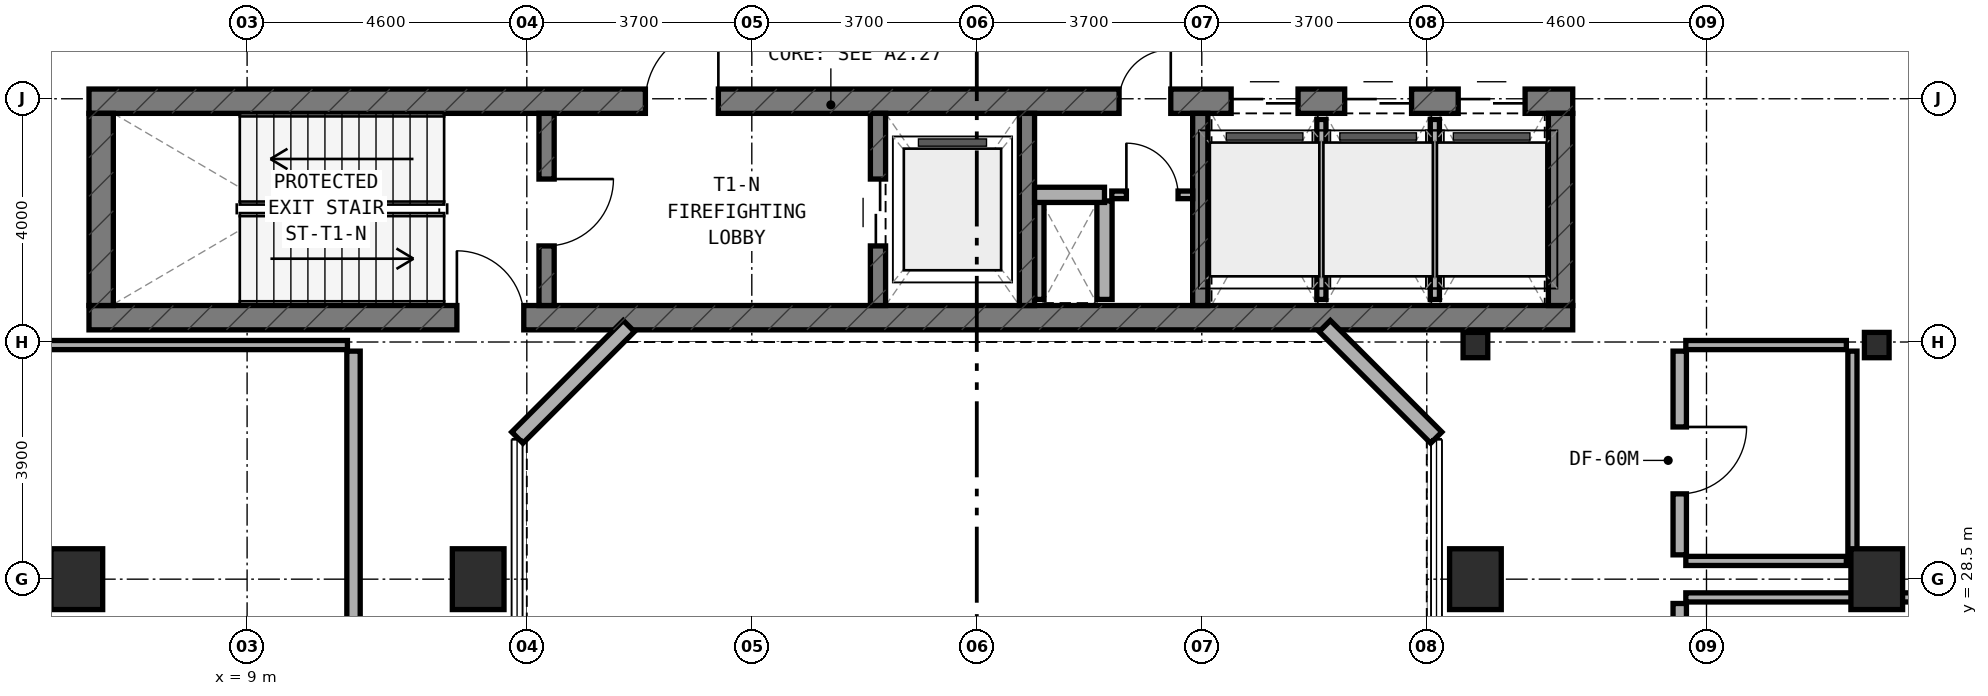
"""IFC4 building model, lengths in metres.
Left out: names, types, materials, properties, quantities, classifications, styles, units other than length and angle.
Written with IfcOpenShell. Run it as: python <this file> out.ifc"""

import sys

from ifc_helpers import new_model, si_unit, direction, frame, frame_2d, origin, origin_2d, place, context, subcontext, project, spatial, rectangle, i_section, extrude, element, fill, save


model = new_model("IFC4")
c1 = context("Model", 3, precision=1e-05, world=origin(), true_north=direction((0.0, 1.0)))
c2 = subcontext(c1, "Body", "Model", "MODEL_VIEW")
j1 = project(units=[si_unit("LENGTHUNIT", "METRE"), si_unit("PLANEANGLEUNIT", "RADIAN")], contexts=[c1])
p1 = place(None, origin())
s1 = spatial("IfcSite", under=j1, at=p1, CompositionType="ELEMENT")
p2 = place(p1, origin())
s2 = spatial("IfcBuilding", under=s1, at=p2, CompositionType="ELEMENT")
p3 = place(p2, frame((0.0, 0.0, 119.5)))
s3 = spatial("IfcBuildingStorey", under=s2, at=p3, CompositionType="ELEMENT", Elevation=119.5)
p4 = place(p3, frame((6.4, 32.8, 0.0), z_axis=(0.0, 0.0, 1.0), x_axis=(1.0, 0.0, 0.0)))
e1 = element("IfcWall", 1, at=p4, inside=s3, PredefinedType="SHEAR", context=c2, shape_type="SweptSolid", body=[
    extrude(rectangle(XDim=24.4, YDim=0.4, at=frame_2d((12.2, 0.0))), origin(), (0.0, 0.0, 1.0), 4.5),
])
p5 = place(p4, frame((6.05, 0.0, 0.0)))
e2 = element("IfcOpeningElement", 2, at=p5, cuts=e1, PredefinedType="OPENING", context=c2, shape_type="SweptSolid", body=[
    extrude(rectangle(XDim=1.1, YDim=2.15, at=frame_2d((0.55, 1.075))), frame((0.0, 0.21, 0.0), z_axis=(0.0, -1.0, 0.0), x_axis=(1.0, 0.0, 0.0)), (0.0, 0.0, 1.0), 0.42),
])
p6 = place(p3, frame((6.4, 36.36, 0.0), z_axis=(0.0, 0.0, 1.0), x_axis=(1.0, 0.0, 0.0)))
e3 = element("IfcWall", 3, at=p6, inside=s3, PredefinedType="SHEAR", context=c2, shape_type="SweptSolid", body=[
    extrude(rectangle(XDim=24.4, YDim=0.4, at=frame_2d((12.2, 0.0))), origin(), (0.0, 0.0, 1.0), 4.5),
])
p7 = place(p6, frame((9.15, 0.0, 0.0)))
e4 = element("IfcOpeningElement", 4, at=p7, cuts=e3, PredefinedType="OPENING", context=c2, shape_type="SweptSolid", body=[
    extrude(rectangle(XDim=1.2, YDim=2.15, at=frame_2d((0.6, 1.075))), frame((0.0, 0.21, 0.0), z_axis=(0.0, -1.0, 0.0), x_axis=(1.0, 0.0, 0.0)), (0.0, 0.0, 1.0), 0.42),
])
p8 = place(p6, frame((16.94, 0.0, 0.0)))
e5 = element("IfcOpeningElement", 5, at=p8, cuts=e3, PredefinedType="OPENING", context=c2, shape_type="SweptSolid", body=[
    extrude(rectangle(XDim=0.85, YDim=2.1, at=frame_2d((0.425, 1.05))), frame((0.0, 0.21, 0.0), z_axis=(0.0, -1.0, 0.0), x_axis=(1.0, 0.0, 0.0)), (0.0, 0.0, 1.0), 0.42),
])
p9 = place(p6, frame((18.783, 0.0, 0.0)))
e6 = element("IfcOpeningElement", 6, at=p9, cuts=e3, PredefinedType="OPENING", context=c2, shape_type="SweptSolid", body=[
    extrude(rectangle(XDim=1.1, YDim=2.15, at=frame_2d((0.55, 1.075))), frame((0.0, 0.21, 0.0), z_axis=(0.0, -1.0, 0.0), x_axis=(1.0, 0.0, 0.0)), (0.0, 0.0, 1.0), 0.42),
])
p10 = place(p6, frame((20.65, 0.0, 0.0)))
e7 = element("IfcOpeningElement", 7, at=p10, cuts=e3, PredefinedType="OPENING", context=c2, shape_type="SweptSolid", body=[
    extrude(rectangle(XDim=1.1, YDim=2.15, at=frame_2d((0.55, 1.075))), frame((0.0, 0.21, 0.0), z_axis=(0.0, -1.0, 0.0), x_axis=(1.0, 0.0, 0.0)), (0.0, 0.0, 1.0), 0.42),
])
p11 = place(p6, frame((22.517, 0.0, 0.0)))
e8 = element("IfcOpeningElement", 8, at=p11, cuts=e3, PredefinedType="OPENING", context=c2, shape_type="SweptSolid", body=[
    extrude(rectangle(XDim=1.1, YDim=2.15, at=frame_2d((0.55, 1.075))), frame((0.0, 0.21, 0.0), z_axis=(0.0, -1.0, 0.0), x_axis=(1.0, 0.0, 0.0)), (0.0, 0.0, 1.0), 0.42),
])
for number, where, z_axis, x_axis in (
    (9, (6.6, 33.0, 0.0), (0.0, 0.0, 1.0), (0.0, 1.0, 0.0)),
    (10, (30.6, 33.0, 0.0), (0.0, 0.0, 1.0), (0.0, 1.0, 0.0)),
):
    element("IfcWall", number, at=place(p3, frame(where, z_axis=z_axis, x_axis=x_axis)), inside=s3, PredefinedType="SHEAR", context=c2, shape_type="SweptSolid", body=[
        extrude(rectangle(XDim=3.16, YDim=0.4, at=frame_2d((1.58, 0.0))), origin(), (0.0, 0.0, 1.0), 4.5),
    ])
p12 = place(p3, frame((13.925, 33.0, 0.0), z_axis=(0.0, 0.0, 1.0), x_axis=(0.0, 1.0, 0.0)))
e11 = element("IfcWall", 11, at=p12, inside=s3, PredefinedType="STANDARD", context=c2, shape_type="SweptSolid", body=[
    extrude(rectangle(XDim=3.16, YDim=0.25, at=frame_2d((1.58, 0.0))), origin(), (0.0, 0.0, 1.0), 4.22),
])
p13 = place(p12, frame((0.98, 0.0, 0.0)))
e12 = element("IfcOpeningElement", 12, at=p13, cuts=e11, PredefinedType="OPENING", context=c2, shape_type="SweptSolid", body=[
    extrude(rectangle(XDim=1.1, YDim=2.15, at=frame_2d((0.55, 1.075))), frame((0.0, 0.135, 0.0), z_axis=(0.0, -1.0, 0.0), x_axis=(1.0, 0.0, 0.0)), (0.0, 0.0, 1.0), 0.27),
])
p14 = place(p3, frame((19.375, 33.0, 0.0), z_axis=(0.0, 0.0, 1.0), x_axis=(0.0, 1.0, 0.0)))
e13 = element("IfcWall", 13, at=p14, inside=s3, PredefinedType="STANDARD", context=c2, shape_type="SweptSolid", body=[
    extrude(rectangle(XDim=3.16, YDim=0.25, at=frame_2d((1.58, 0.0))), origin(), (0.0, 0.0, 1.0), 4.22),
])
p15 = place(p14, frame((0.98, 0.0, 0.0)))
e14 = element("IfcOpeningElement", 14, at=p15, cuts=e13, PredefinedType="OPENING", context=c2, shape_type="SweptSolid", body=[
    extrude(rectangle(XDim=1.1, YDim=2.15, at=frame_2d((0.55, 1.075))), frame((0.0, 0.135, 0.0), z_axis=(0.0, -1.0, 0.0), x_axis=(1.0, 0.0, 0.0)), (0.0, 0.0, 1.0), 0.27),
])
for number, where, z_axis, x_axis in (
    (15, (21.825, 33.0, 0.0), (0.0, 0.0, 1.0), (0.0, 1.0, 0.0)),
    (16, (24.675, 33.0, 0.0), (0.0, 0.0, 1.0), (0.0, 1.0, 0.0)),
):
    element("IfcWall", number, at=place(p3, frame(where, z_axis=z_axis, x_axis=x_axis)), inside=s3, PredefinedType="STANDARD", context=c2, shape_type="SweptSolid", body=[
        extrude(rectangle(XDim=3.16, YDim=0.25, at=frame_2d((1.58, 0.0))), origin(), (0.0, 0.0, 1.0), 4.22),
    ])
for number, where, z_axis, x_axis in (
    (17, (6.2, 28.5, 0.0), (0.0, 0.0, 1.0), (1.0, 0.0, 0.0)),
    (18, (35.8, 28.5, 0.0), (0.0, 0.0, 1.0), (1.0, 0.0, 0.0)),
):
    element("IfcColumn", number, at=place(p3, frame(where, z_axis=z_axis, x_axis=x_axis)), inside=s3, PredefinedType="COLUMN", context=c2, shape_type="SweptSolid", body=[
        extrude(rectangle(XDim=0.85, YDim=1.0, at=origin_2d()), origin(), (0.0, 0.0, 1.0), 4.5),
    ])
p16 = place(p3, frame((35.8, 32.35, 0.0), z_axis=(0.0, 0.0, 1.0), x_axis=(1.0, 0.0, 0.0)))
e19 = element("IfcColumn", 19, at=p16, inside=s3, PredefinedType="COLUMN", context=c2, shape_type="SweptSolid", body=[
    extrude(i_section(OverallWidth=0.406, OverallDepth=0.416, WebThickness=0.024, FlangeThickness=0.039, FilletRadius=0.015, at=origin_2d()), origin(), (0.0, 0.0, 1.0), 4.5),
])
p17 = place(p3, frame((12.8, 28.5, 0.0), z_axis=(0.0, 0.0, 1.0), x_axis=(1.0, 0.0, 0.0)))
e20 = element("IfcColumn", 20, at=p17, inside=s3, PredefinedType="COLUMN", context=c2, shape_type="SweptSolid", body=[
    extrude(rectangle(XDim=0.85, YDim=1.0, at=origin_2d()), origin(), (0.0, 0.0, 1.0), 4.5),
])
p18 = place(p3, frame((29.2, 32.35, 0.0), z_axis=(0.0, 0.0, 1.0), x_axis=(1.0, 0.0, 0.0)))
e21 = element("IfcColumn", 21, at=p18, inside=s3, PredefinedType="COLUMN", context=c2, shape_type="SweptSolid", body=[
    extrude(i_section(OverallWidth=0.406, OverallDepth=0.416, WebThickness=0.024, FlangeThickness=0.039, FilletRadius=0.015, at=origin_2d()), origin(), (0.0, 0.0, 1.0), 4.5),
])
p19 = place(p3, frame((29.2, 28.5, 0.0), z_axis=(0.0, 0.0, 1.0), x_axis=(1.0, 0.0, 0.0)))
e22 = element("IfcColumn", 22, at=p19, inside=s3, PredefinedType="COLUMN", context=c2, shape_type="SweptSolid", body=[
    extrude(rectangle(XDim=0.85, YDim=1.0, at=origin_2d()), origin(), (0.0, 0.0, 1.0), 4.5),
])
for number, where, z_axis, x_axis in (
    (23, (28.556, 30.828, 0.0), (0.0, 0.0, 1.0), (-0.707, 0.707, 0.0)),
    (24, (15.278, 32.662, 0.0), (0.0, 0.0, 1.0), (-0.707, -0.707, 0.0)),
):
    element("IfcWall", number, at=place(p3, frame(where, z_axis=z_axis, x_axis=x_axis)), inside=s3, PredefinedType="STANDARD", context=c2, shape_type="SweptSolid", body=[
        extrude(rectangle(XDim=2.594, YDim=0.26, at=frame_2d((1.297, 0.0))), origin(), (0.0, 0.0, 1.0), 4.22),
    ])
p20 = place(p3, frame((22.03, 33.1, 0.0), z_axis=(0.0, 0.0, 1.0), x_axis=(0.0, 1.0, 0.0)))
e25 = element("IfcWall", 25, at=p20, inside=s3, PredefinedType="PARTITIONING", context=c2, shape_type="SweptSolid", body=[
    extrude(rectangle(XDim=1.62, YDim=0.15, at=frame_2d((0.81, 0.0))), origin(), (0.0, 0.0, 1.0), 4.22),
])
p21 = place(p3, frame((23.1, 33.1, 0.0), z_axis=(0.0, 0.0, 1.0), x_axis=(0.0, 1.0, 0.0)))
e26 = element("IfcWall", 26, at=p21, inside=s3, PredefinedType="SOLIDWALL", context=c2, shape_type="SweptSolid", body=[
    extrude(rectangle(XDim=1.62, YDim=0.25, at=frame_2d((0.81, 0.0))), origin(), (0.0, 0.0, 1.0), 4.22),
])
p22 = place(p3, frame((21.95, 34.82, 0.0), z_axis=(0.0, 0.0, 1.0), x_axis=(1.0, 0.0, 0.0)))
e27 = element("IfcWall", 27, at=p22, inside=s3, PredefinedType="SOLIDWALL", context=c2, shape_type="SweptSolid", body=[
    extrude(rectangle(XDim=1.15, YDim=0.25, at=frame_2d((0.575, 0.0))), origin(), (0.0, 0.0, 1.0), 4.22),
])
p23 = place(p3, frame((23.22, 34.82, 0.0), z_axis=(0.0, 0.0, 1.0), x_axis=(1.0, 0.0, 0.0)))
e28 = element("IfcWall", 28, at=p23, inside=s3, PredefinedType="PARTITIONING", context=c2, shape_type="SweptSolid", body=[
    extrude(rectangle(XDim=1.33, YDim=0.125, at=frame_2d((0.665, 0.0))), origin(), (0.0, 0.0, 1.0), 4.22),
])
p24 = place(p23, frame((0.24, 0.0, 0.0)))
e29 = element("IfcOpeningElement", 29, at=p24, cuts=e28, PredefinedType="OPENING", context=c2, shape_type="SweptSolid", body=[
    extrude(rectangle(XDim=0.85, YDim=2.1, at=frame_2d((0.425, 1.05))), frame((0.0, 0.073, 0.0), z_axis=(0.0, -1.0, 0.0), x_axis=(1.0, 0.0, 0.0)), (0.0, 0.0, 1.0), 0.145),
])
p25 = place(p3, frame((26.667, 33.1, 0.0), z_axis=(0.0, 0.0, 1.0), x_axis=(0.0, 1.0, 0.0)))
e30 = element("IfcWall", 30, at=p25, inside=s3, PredefinedType="PARTITIONING", context=c2, shape_type="SweptSolid", body=[
    extrude(rectangle(XDim=2.96, YDim=0.15, at=frame_2d((1.48, 0.0))), origin(), (0.0, 0.0, 1.0), 4.22),
])
p26 = place(p3, frame((28.533, 33.1, 0.0), z_axis=(0.0, 0.0, 1.0), x_axis=(0.0, 1.0, 0.0)))
e31 = element("IfcWall", 31, at=p26, inside=s3, PredefinedType="PARTITIONING", context=c2, shape_type="SweptSolid", body=[
    extrude(rectangle(XDim=2.96, YDim=0.15, at=frame_2d((1.48, 0.0))), origin(), (0.0, 0.0, 1.0), 3.695),
])
p27 = place(p3, frame((32.66, 28.2, 0.0), z_axis=(0.0, 0.0, 1.0), x_axis=(1.0, 0.0, 0.0)))
e32 = element("IfcWall", 32, at=p27, inside=s3, PredefinedType="PARTITIONING", context=c2, shape_type="SweptSolid", body=[
    extrude(rectangle(XDim=8.04, YDim=0.15, at=frame_2d((4.02, 0.0))), origin(), (0.0, 0.0, 1.0), 3.835),
])
p28 = place(p3, frame((32.56, 21.9, 0.0), z_axis=(0.0, 0.0, 1.0), x_axis=(0.0, 1.0, 0.0)))
e33 = element("IfcWall", 33, at=p28, inside=s3, PredefinedType="SOLIDWALL", context=c2, shape_type="SweptSolid", body=[
    extrude(rectangle(XDim=6.2, YDim=0.22, at=frame_2d((3.1, 0.0))), origin(), (0.0, 0.0, 1.0), 4.22),
])
p29 = place(p28, frame((2.285, 0.0, 0.0)))
e34 = element("IfcOpeningElement", 34, at=p29, cuts=e33, PredefinedType="OPENING", context=c2, shape_type="SweptSolid", body=[
    extrude(rectangle(XDim=1.1, YDim=2.1, at=frame_2d((0.55, 1.05))), frame((0.0, 0.12, 0.0), z_axis=(0.0, -1.0, 0.0), x_axis=(1.0, 0.0, 0.0)), (0.0, 0.0, 1.0), 0.24),
])
p30 = place(p3, frame((35.4, 28.9, 0.0), z_axis=(0.0, 0.0, 1.0), x_axis=(0.0, 1.0, 0.0)))
e35 = element("IfcWall", 35, at=p30, inside=s3, PredefinedType="PARTITIONING", context=c2, shape_type="SweptSolid", body=[
    extrude(rectangle(XDim=3.35, YDim=0.15, at=frame_2d((1.675, 0.0))), origin(), (0.0, 0.0, 1.0), 4.22),
])
p31 = place(p3, frame((32.66, 28.8, 0.0), z_axis=(0.0, 0.0, 1.0), x_axis=(1.0, 0.0, 0.0)))
e36 = element("IfcWall", 36, at=p31, inside=s3, PredefinedType="PARTITIONING", context=c2, shape_type="SweptSolid", body=[
    extrude(rectangle(XDim=2.64, YDim=0.15, at=frame_2d((1.32, 0.0))), origin(), (0.0, 0.0, 1.0), 4.22),
])
p32 = place(p3, frame((32.66, 32.35, 0.0), z_axis=(0.0, 0.0, 1.0), x_axis=(1.0, 0.0, 0.0)))
e37 = element("IfcWall", 37, at=p32, inside=s3, PredefinedType="PARTITIONING", context=c2, shape_type="SweptSolid", body=[
    extrude(rectangle(XDim=2.64, YDim=0.15, at=frame_2d((1.32, 0.0))), origin(), (0.0, 0.0, 1.0), 3.695),
])
p33 = place(p3, frame((32.56, 28.9, 0.0), z_axis=(0.0, 0.0, 1.0), x_axis=(0.0, 1.0, 0.0)))
e38 = element("IfcWall", 38, at=p33, inside=s3, PredefinedType="SOLIDWALL", context=c2, shape_type="SweptSolid", body=[
    extrude(rectangle(XDim=3.35, YDim=0.22, at=frame_2d((1.675, 0.0))), origin(), (0.0, 0.0, 1.0), 4.22),
])
p34 = place(p33, frame((1.003, 0.0, 0.0)))
e39 = element("IfcOpeningElement", 39, at=p34, cuts=e38, PredefinedType="OPENING", context=c2, shape_type="SweptSolid", body=[
    extrude(rectangle(XDim=1.1, YDim=2.1, at=frame_2d((0.55, 1.05))), frame((0.0, 0.12, 0.0), z_axis=(0.0, -1.0, 0.0), x_axis=(1.0, 0.0, 0.0)), (0.0, 0.0, 1.0), 0.24),
])
p35 = place(p3, frame((1.3, 32.35, 0.0), z_axis=(0.0, 0.0, 1.0), x_axis=(1.0, 0.0, 0.0)))
e40 = element("IfcWall", 40, at=p35, inside=s3, PredefinedType="PARTITIONING", context=c2, shape_type="SweptSolid", body=[
    extrude(rectangle(XDim=9.35, YDim=0.15, at=frame_2d((4.675, 0.0))), origin(), (0.0, 0.0, 1.0), 4.22),
])
p36 = place(p3, frame((10.75, 17.75, 0.0), z_axis=(0.0, 0.0, 1.0), x_axis=(0.0, 1.0, 0.0)))
e41 = element("IfcWall", 41, at=p36, inside=s3, PredefinedType="SOLIDWALL", context=c2, shape_type="SweptSolid", body=[
    extrude(rectangle(XDim=14.5, YDim=0.22, at=frame_2d((7.25, 0.0))), origin(), (0.0, 0.0, 1.0), 3.695),
])
p37 = place(p36, frame((6.02, 0.0, 0.0)))
e42 = element("IfcOpeningElement", 42, at=p37, cuts=e41, PredefinedType="OPENING", context=c2, shape_type="SweptSolid", body=[
    extrude(rectangle(XDim=1.1, YDim=2.1, at=frame_2d((0.55, 1.05))), frame((0.0, 0.12, 0.0), z_axis=(0.0, -1.0, 0.0), x_axis=(1.0, 0.0, 0.0)), (0.0, 0.0, 1.0), 0.24),
])
p38 = place(p13, frame((1.1, 0.0, 0.0), z_axis=(0.0, 0.0, 1.0), x_axis=(-1.0, 0.0, 0.0)))
e43 = element("IfcDoor", 43, at=p38, inside=s3, OperationType="SINGLE_SWING_LEFT", PredefinedType="DOOR", context=c2, shape_type="SweptSolid", body=[
    extrude(rectangle(XDim=1.1, YDim=2.15, at=frame_2d((0.55, 1.075))), frame((0.0, 0.025, 0.0), z_axis=(0.0, -1.0, 0.0), x_axis=(1.0, 0.0, 0.0)), (0.0, 0.0, 1.0), 0.05),
])
fill(e12, e43)
p39 = place(p7, origin())
e44 = element("IfcDoor", 44, at=p39, inside=s3, OperationType="SINGLE_SWING_RIGHT", PredefinedType="DOOR", context=c2, shape_type="SweptSolid", body=[
    extrude(rectangle(XDim=1.2, YDim=2.15, at=frame_2d((0.6, 1.075))), frame((0.0, 0.025, 0.0), z_axis=(0.0, -1.0, 0.0), x_axis=(1.0, 0.0, 0.0)), (0.0, 0.0, 1.0), 0.05),
])
fill(e4, e44)
p40 = place(p15, origin())
e45 = element("IfcDoor", 45, at=p40, inside=s3, OperationType="DOUBLE_DOOR_SLIDING", PredefinedType="DOOR", context=c2, shape_type="SweptSolid", body=[
    extrude(rectangle(XDim=1.1, YDim=2.15, at=frame_2d((0.55, 1.075))), frame((0.0, 0.025, 0.0), z_axis=(0.0, -1.0, 0.0), x_axis=(1.0, 0.0, 0.0)), (0.0, 0.0, 1.0), 0.05),
])
fill(e14, e45)
p41 = place(p8, origin())
e46 = element("IfcDoor", 46, at=p41, inside=s3, OperationType="SINGLE_SWING_RIGHT", PredefinedType="DOOR", context=c2, shape_type="SweptSolid", body=[
    extrude(rectangle(XDim=0.85, YDim=2.1, at=frame_2d((0.425, 1.05))), frame((0.0, 0.025, 0.0), z_axis=(0.0, -1.0, 0.0), x_axis=(1.0, 0.0, 0.0)), (0.0, 0.0, 1.0), 0.05),
])
fill(e5, e46)
p42 = place(p9, origin())
e47 = element("IfcDoor", 47, at=p42, inside=s3, OperationType="DOUBLE_DOOR_SLIDING", PredefinedType="DOOR", context=c2, shape_type="SweptSolid", body=[
    extrude(rectangle(XDim=1.1, YDim=2.15, at=frame_2d((0.55, 1.075))), frame((0.0, 0.025, 0.0), z_axis=(0.0, -1.0, 0.0), x_axis=(1.0, 0.0, 0.0)), (0.0, 0.0, 1.0), 0.05),
])
fill(e6, e47)
p43 = place(p10, origin())
e48 = element("IfcDoor", 48, at=p43, inside=s3, OperationType="DOUBLE_DOOR_SLIDING", PredefinedType="DOOR", context=c2, shape_type="SweptSolid", body=[
    extrude(rectangle(XDim=1.1, YDim=2.15, at=frame_2d((0.55, 1.075))), frame((0.0, 0.025, 0.0), z_axis=(0.0, -1.0, 0.0), x_axis=(1.0, 0.0, 0.0)), (0.0, 0.0, 1.0), 0.05),
])
fill(e7, e48)
p44 = place(p11, origin())
e49 = element("IfcDoor", 49, at=p44, inside=s3, OperationType="DOUBLE_DOOR_SLIDING", PredefinedType="DOOR", context=c2, shape_type="SweptSolid", body=[
    extrude(rectangle(XDim=1.1, YDim=2.15, at=frame_2d((0.55, 1.075))), frame((0.0, 0.025, 0.0), z_axis=(0.0, -1.0, 0.0), x_axis=(1.0, 0.0, 0.0)), (0.0, 0.0, 1.0), 0.05),
])
fill(e8, e49)
p45 = place(p5, origin())
e50 = element("IfcDoor", 50, at=p45, inside=s3, OperationType="SINGLE_SWING_LEFT", PredefinedType="DOOR", context=c2, shape_type="SweptSolid", body=[
    extrude(rectangle(XDim=1.1, YDim=2.15, at=frame_2d((0.55, 1.075))), frame((0.0, 0.025, 0.0), z_axis=(0.0, -1.0, 0.0), x_axis=(1.0, 0.0, 0.0)), (0.0, 0.0, 1.0), 0.05),
])
fill(e2, e50)
p46 = place(p24, origin())
e51 = element("IfcDoor", 51, at=p46, inside=s3, OperationType="SINGLE_SWING_LEFT", PredefinedType="DOOR", context=c2, shape_type="SweptSolid", body=[
    extrude(rectangle(XDim=0.85, YDim=2.1, at=frame_2d((0.425, 1.05))), frame((0.0, 0.025, 0.0), z_axis=(0.0, -1.0, 0.0), x_axis=(1.0, 0.0, 0.0)), (0.0, 0.0, 1.0), 0.05),
])
fill(e29, e51)
p47 = place(p34, frame((1.1, 0.0, 0.0), z_axis=(0.0, 0.0, 1.0), x_axis=(-1.0, 0.0, 0.0)))
e52 = element("IfcDoor", 52, at=p47, inside=s3, OperationType="SINGLE_SWING_LEFT", PredefinedType="DOOR", context=c2, shape_type="SweptSolid", body=[
    extrude(rectangle(XDim=1.1, YDim=2.1, at=frame_2d((0.55, 1.05))), frame((0.0, 0.025, 0.0), z_axis=(0.0, -1.0, 0.0), x_axis=(1.0, 0.0, 0.0)), (0.0, 0.0, 1.0), 0.05),
])
fill(e39, e52)
save(model, sys.argv[1])
